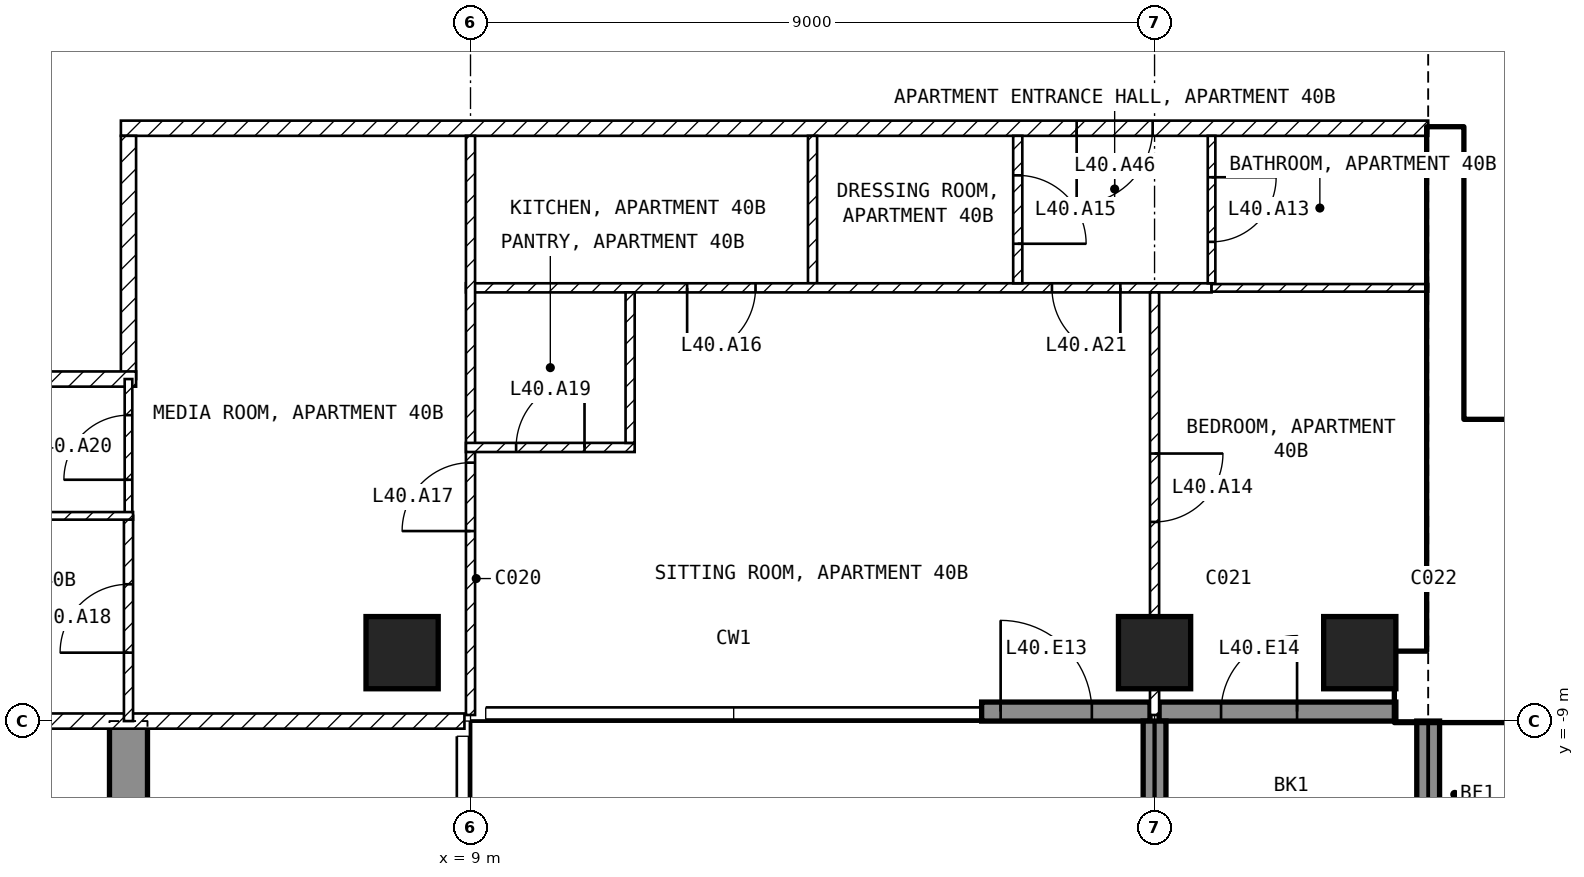
"""IFC4 building model, lengths in metres.
Left out: names, types, materials, properties, quantities, classifications, styles, units other than length and angle.
Written with IfcOpenShell. Run it as: python <this file> out.ifc"""

import sys

from ifc_helpers import new_model, si_unit, direction, frame, frame_2d, origin, origin_2d, place, context, subcontext, project, spatial, polyline, rectangle, outline, extrude, element, fill, save


model = new_model("IFC4")
c1 = context("Model", 3, precision=1e-05, world=origin(), true_north=direction((0.0, 1.0)))
c2 = subcontext(c1, "Body", "Model", "MODEL_VIEW")
j1 = project(units=[si_unit("LENGTHUNIT", "METRE"), si_unit("PLANEANGLEUNIT", "RADIAN")], contexts=[c1])
p1 = place(None, origin())
s1 = spatial("IfcSite", under=j1, at=p1, CompositionType="ELEMENT")
p2 = place(p1, origin())
s2 = spatial("IfcBuilding", under=s1, at=p2, CompositionType="ELEMENT")
p3 = place(p2, frame((0.0, 0.0, 166.6)))
s3 = spatial("IfcBuildingStorey", under=s2, at=p3, CompositionType="ELEMENT", Elevation=166.6)
for number, where, z_axis, x_axis in (
    (1, (8.1, -8.1, -0.25), (0.0, 0.0, 1.0), (1.0, 0.0, 0.0)),
    (2, (18.0, -8.1, -0.25), (0.0, 0.0, 1.0), (1.0, 0.0, 0.0)),
    (3, (20.7, -8.1, -0.25), (0.0, 0.0, 1.0), (1.0, 0.0, 0.0)),
):
    element("IfcColumn", number, at=place(p3, frame(where, z_axis=z_axis, x_axis=x_axis)), inside=s3, PredefinedType="COLUMN", context=c2, shape_type="SweptSolid", body=[
        extrude(rectangle(XDim=0.95, YDim=0.95, at=origin_2d()), origin(), (0.0, 0.0, 1.0), 3.5),
    ])
p4 = place(p3, frame((4.25, -20.225, -0.25), z_axis=(1.0, 0.0, 0.0), x_axis=(0.0, 1.0, 0.0)))
e4 = element("IfcWall", 4, at=p4, inside=s3, PredefinedType="SHEAR", context=c2, shape_type="SweptSolid", body=[
    extrude(outline(polyline([(0.0, 0.0), (6.725, 0.0), (6.725, 2.65), (9.125, 2.65), (9.125, 0.0), (11.225, 0.0), (11.225, 3.5), (0.0, 3.5), (0.0, 0.0)])), origin(), (0.0, 0.0, 1.0), 0.5),
])
p5 = place(p3, frame((15.725, -8.875, 0.0), z_axis=(0.0, 0.0, 1.0), x_axis=(1.0, 0.0, 0.0)))
e5 = element("IfcWall", 5, at=p5, inside=s3, PredefinedType="SOLIDWALL", context=c2, shape_type="SweptSolid", body=[
    extrude(rectangle(XDim=2.215, YDim=0.25, at=frame_2d((1.107, 0.0))), origin(), (0.0, 0.0, 1.0), 3.25),
])
p6 = place(p5, frame((0.25, 0.0, 0.0)))
e6 = element("IfcOpeningElement", 6, at=p6, cuts=e5, PredefinedType="OPENING", context=c2, shape_type="SweptSolid", body=[
    extrude(rectangle(XDim=1.2, YDim=2.4, at=frame_2d((0.6, 1.2))), frame((0.0, 0.135, 0.0), z_axis=(0.0, -1.0, 0.0), x_axis=(1.0, 0.0, 0.0)), (0.0, 0.0, 1.0), 0.27),
])
p7 = place(p3, frame((18.06, -8.875, 0.0), z_axis=(0.0, 0.0, 1.0), x_axis=(1.0, 0.0, 0.0)))
e7 = element("IfcWall", 7, at=p7, inside=s3, PredefinedType="SOLIDWALL", context=c2, shape_type="SweptSolid", body=[
    extrude(rectangle(XDim=3.115, YDim=0.25, at=frame_2d((1.558, 0.0))), origin(), (0.0, 0.0, 1.0), 3.25),
])
p8 = place(p7, frame((0.815, 0.0, 0.0)))
e8 = element("IfcOpeningElement", 8, at=p8, cuts=e7, PredefinedType="OPENING", context=c2, shape_type="SweptSolid", body=[
    extrude(rectangle(XDim=1.0, YDim=2.4, at=frame_2d((0.5, 1.2))), frame((0.0, 0.135, 0.0), z_axis=(0.0, -1.0, 0.0), x_axis=(1.0, 0.0, 0.0)), (0.0, 0.0, 1.0), 0.27),
])
for number, where, z_axis, x_axis in (
    (9, (18.0, -9.0, 0.0), (0.0, 0.0, 1.0), (0.0, -1.0, 0.0)),
    (10, (21.6, -9.0, 0.0), (0.0, 0.0, 1.0), (0.0, -1.0, 0.0)),
):
    element("IfcWall", number, at=place(p3, frame(where, z_axis=z_axis, x_axis=x_axis)), inside=s3, PredefinedType="SOLIDWALL", context=c2, shape_type="SweptSolid", body=[
        extrude(rectangle(XDim=2.7, YDim=0.3, at=frame_2d((1.35, 0.0))), origin(), (0.0, 0.0, 1.0), 3.25),
    ])
p9 = place(p3, frame((21.175, -8.55, 0.0), z_axis=(0.0, 0.0, 1.0), x_axis=(1.0, 0.0, 0.0)))
e11 = element("IfcWall", 11, at=p9, inside=s3, PredefinedType="SHEAR", context=c2, shape_type="SweptSolid", body=[
    extrude(rectangle(XDim=9.025, YDim=0.9, at=frame_2d((4.512, 0.0))), origin(), (0.0, 0.0, 1.0), 3.25),
])
p10 = place(p3, frame((21.825, -8.1, 0.0), z_axis=(0.0, 0.0, 1.0), x_axis=(0.0, 1.0, 0.0)))
e12 = element("IfcWall", 12, at=p10, inside=s3, PredefinedType="SHEAR", context=c2, shape_type="SweptSolid", body=[
    extrude(rectangle(XDim=6.9, YDim=0.45, at=frame_2d((3.45, 0.0))), origin(), (0.0, 0.0, 1.0), 3.25),
])
p11 = place(p3, frame((22.05, -5.15, 0.0), z_axis=(0.0, 0.0, 1.0), x_axis=(1.0, 0.0, 0.0)))
e13 = element("IfcWall", 13, at=p11, inside=s3, PredefinedType="SOLIDWALL", context=c2, shape_type="SweptSolid", body=[
    extrude(rectangle(XDim=6.3, YDim=0.2, at=frame_2d((3.15, 0.0))), origin(), (0.0, 0.0, 1.0), 3.25),
])
p12 = place(p11, frame((0.2, 0.0, 0.0)))
e14 = element("IfcOpeningElement", 14, at=p12, cuts=e13, PredefinedType="OPENING", context=c2, shape_type="SweptSolid", body=[
    extrude(rectangle(XDim=1.0, YDim=2.1, at=frame_2d((0.5, 1.05))), frame((0.0, 0.11, 0.0), z_axis=(0.0, -1.0, 0.0), x_axis=(1.0, 0.0, 0.0)), (0.0, 0.0, 1.0), 0.22),
])
p13 = place(p3, frame((21.6, -1.2, 0.0), z_axis=(0.0, 0.0, 1.0), x_axis=(-1.0, 0.0, 0.0)))
e15 = element("IfcWall", 15, at=p13, inside=s3, PredefinedType="PARTITIONING", context=c2, shape_type="SweptSolid", body=[
    extrude(rectangle(XDim=17.2, YDim=0.2, at=frame_2d((8.6, 0.0))), origin(), (0.0, 0.0, 1.0), 3.25),
])
p14 = place(p13, frame((3.625, 0.0, 0.0)))
e16 = element("IfcOpeningElement", 16, at=p14, cuts=e15, PredefinedType="OPENING", context=c2, shape_type="SweptSolid", body=[
    extrude(rectangle(XDim=1.0, YDim=2.1, at=frame_2d((0.5, 1.05))), frame((0.0, 0.11, 0.0), z_axis=(0.0, -1.0, 0.0), x_axis=(1.0, 0.0, 0.0)), (0.0, 0.0, 1.0), 0.22),
])
p15 = place(p3, frame((4.5, -1.3, 0.0), z_axis=(0.0, 0.0, 1.0), x_axis=(0.0, -1.0, 0.0)))
e17 = element("IfcWall", 17, at=p15, inside=s3, PredefinedType="PARTITIONING", context=c2, shape_type="SweptSolid", body=[
    extrude(rectangle(XDim=3.2, YDim=0.2, at=frame_2d((1.6, 0.0))), origin(), (0.0, 0.0, 1.0), 3.25),
])
p16 = place(p3, frame((4.6, -4.5, 0.0), z_axis=(0.0, 0.0, 1.0), x_axis=(-1.0, 0.0, 0.0)))
e18 = element("IfcWall", 18, at=p16, inside=s3, PredefinedType="PARTITIONING", context=c2, shape_type="SweptSolid", body=[
    extrude(rectangle(XDim=3.5, YDim=0.2, at=frame_2d((1.75, 0.0))), origin(), (0.0, 0.0, 1.0), 3.25),
])
p17 = place(p3, frame((8.92, -9.0, 0.0), z_axis=(0.0, 0.0, 1.0), x_axis=(-1.0, 0.0, 0.0)))
e19 = element("IfcWall", 19, at=p17, inside=s3, PredefinedType="PARTITIONING", context=c2, shape_type="SweptSolid", body=[
    extrude(rectangle(XDim=17.84, YDim=0.2, at=frame_2d((8.92, 0.0))), origin(), (0.0, 0.0, 1.0), 3.25),
])
p18 = place(p17, frame((8.42, 0.0, 0.0)))
e20 = element("IfcOpeningElement", 20, at=p18, cuts=e19, PredefinedType="OPENING", context=c2, shape_type="SweptSolid", body=[
    extrude(rectangle(XDim=1.0, YDim=2.1, at=frame_2d((0.5, 1.05))), frame((0.0, 0.11, 0.0), z_axis=(0.0, -1.0, 0.0), x_axis=(1.0, 0.0, 0.0)), (0.0, 0.0, 1.0), 0.22),
])
p19 = place(p3, frame((13.5, -1.3, 0.0), z_axis=(0.0, 0.0, 1.0), x_axis=(0.0, -1.0, 0.0)))
e21 = element("IfcWall", 21, at=p19, inside=s3, PredefinedType="PARTITIONING", context=c2, shape_type="SweptSolid", body=[
    extrude(rectangle(XDim=1.94, YDim=0.12, at=frame_2d((0.97, 0.0))), origin(), (0.0, 0.0, 1.0), 3.25),
])
p20 = place(p3, frame((18.75, -3.3, 0.0), z_axis=(0.0, 0.0, 1.0), x_axis=(-1.0, 0.0, 0.0)))
e22 = element("IfcWall", 22, at=p20, inside=s3, PredefinedType="PARTITIONING", context=c2, shape_type="SweptSolid", body=[
    extrude(rectangle(XDim=9.81, YDim=0.12, at=frame_2d((4.905, 0.0))), origin(), (0.0, 0.0, 1.0), 3.25),
])
p21 = place(p20, frame((6.0, 0.0, 0.0)))
e23 = element("IfcOpeningElement", 23, at=p21, cuts=e22, PredefinedType="OPENING", context=c2, shape_type="SweptSolid", body=[
    extrude(rectangle(XDim=0.9, YDim=2.1, at=frame_2d((0.45, 1.05))), frame((0.0, 0.07, 0.0), z_axis=(0.0, -1.0, 0.0), x_axis=(1.0, 0.0, 0.0)), (0.0, 0.0, 1.0), 0.14),
])
p22 = place(p20, frame((1.2, 0.0, 0.0)))
e24 = element("IfcOpeningElement", 24, at=p22, cuts=e22, PredefinedType="OPENING", context=c2, shape_type="SweptSolid", body=[
    extrude(rectangle(XDim=0.9, YDim=2.1, at=frame_2d((0.45, 1.05))), frame((0.0, 0.07, 0.0), z_axis=(0.0, -1.0, 0.0), x_axis=(1.0, 0.0, 0.0)), (0.0, 0.0, 1.0), 0.14),
])
p23 = place(p3, frame((9.0, -8.92, 0.0), z_axis=(0.0, 0.0, 1.0), x_axis=(0.0, 1.0, 0.0)))
e25 = element("IfcWall", 25, at=p23, inside=s3, PredefinedType="PARTITIONING", context=c2, shape_type="SweptSolid", body=[
    extrude(rectangle(XDim=7.62, YDim=0.12, at=frame_2d((3.81, 0.0))), origin(), (0.0, 0.0, 1.0), 3.25),
])
p24 = place(p23, frame((2.42, 0.0, 0.0)))
e26 = element("IfcOpeningElement", 26, at=p24, cuts=e25, PredefinedType="OPENING", context=c2, shape_type="SweptSolid", body=[
    extrude(rectangle(XDim=0.9, YDim=2.1, at=frame_2d((0.45, 1.05))), frame((0.0, 0.07, 0.0), z_axis=(0.0, -1.0, 0.0), x_axis=(1.0, 0.0, 0.0)), (0.0, 0.0, 1.0), 0.14),
])
p25 = place(p3, frame((16.2, -1.3, 0.0), z_axis=(0.0, 0.0, 1.0), x_axis=(0.0, -1.0, 0.0)))
e27 = element("IfcWall", 27, at=p25, inside=s3, PredefinedType="PARTITIONING", context=c2, shape_type="SweptSolid", body=[
    extrude(rectangle(XDim=1.94, YDim=0.12, at=frame_2d((0.97, 0.0))), origin(), (0.0, 0.0, 1.0), 3.25),
])
p26 = place(p25, frame((0.52, 0.0, 0.0)))
e28 = element("IfcOpeningElement", 28, at=p26, cuts=e27, PredefinedType="OPENING", context=c2, shape_type="SweptSolid", body=[
    extrude(rectangle(XDim=0.9, YDim=2.1, at=frame_2d((0.45, 1.05))), frame((0.0, 0.07, 0.0), z_axis=(0.0, -1.0, 0.0), x_axis=(1.0, 0.0, 0.0)), (0.0, 0.0, 1.0), 0.14),
])
p27 = place(p3, frame((18.75, -1.3, 0.0), z_axis=(0.0, 0.0, 1.0), x_axis=(0.0, -1.0, 0.0)))
e29 = element("IfcWall", 29, at=p27, inside=s3, PredefinedType="PARTITIONING", context=c2, shape_type="SweptSolid", body=[
    extrude(rectangle(XDim=1.94, YDim=0.1, at=frame_2d((0.97, 0.0))), origin(), (0.0, 0.0, 1.0), 3.25),
])
p28 = place(p27, frame((0.545, 0.0, 0.0)))
e30 = element("IfcOpeningElement", 30, at=p28, cuts=e29, PredefinedType="OPENING", context=c2, shape_type="SweptSolid", body=[
    extrude(rectangle(XDim=0.85, YDim=2.1, at=frame_2d((0.425, 1.05))), frame((0.0, 0.06, 0.0), z_axis=(0.0, -1.0, 0.0), x_axis=(1.0, 0.0, 0.0)), (0.0, 0.0, 1.0), 0.12),
])
p29 = place(p3, frame((21.6, -3.3, 0.0), z_axis=(0.0, 0.0, 1.0), x_axis=(-1.0, 0.0, 0.0)))
e31 = element("IfcWall", 31, at=p29, inside=s3, PredefinedType="PARTITIONING", context=c2, shape_type="SweptSolid", body=[
    extrude(rectangle(XDim=2.85, YDim=0.1, at=frame_2d((1.425, 0.0))), origin(), (0.0, 0.0, 1.0), 3.25),
])
p30 = place(p3, frame((8.94, -5.4, 0.0), z_axis=(0.0, 0.0, 1.0), x_axis=(1.0, 0.0, 0.0)))
e32 = element("IfcWall", 32, at=p30, inside=s3, PredefinedType="PARTITIONING", context=c2, shape_type="SweptSolid", body=[
    extrude(rectangle(XDim=2.22, YDim=0.12, at=frame_2d((1.11, 0.0))), origin(), (0.0, 0.0, 1.0), 3.25),
])
p31 = place(p30, frame((0.66, 0.0, 0.0)))
e33 = element("IfcOpeningElement", 33, at=p31, cuts=e32, PredefinedType="OPENING", context=c2, shape_type="SweptSolid", body=[
    extrude(rectangle(XDim=0.9, YDim=2.1, at=frame_2d((0.45, 1.05))), frame((0.0, 0.07, 0.0), z_axis=(0.0, -1.0, 0.0), x_axis=(1.0, 0.0, 0.0)), (0.0, 0.0, 1.0), 0.14),
])
p32 = place(p3, frame((11.1, -5.34, 0.0), z_axis=(0.0, 0.0, 1.0), x_axis=(0.0, 1.0, 0.0)))
e34 = element("IfcWall", 34, at=p32, inside=s3, PredefinedType="PARTITIONING", context=c2, shape_type="SweptSolid", body=[
    extrude(rectangle(XDim=1.98, YDim=0.12, at=frame_2d((0.99, 0.0))), origin(), (0.0, 0.0, 1.0), 3.25),
])
p33 = place(p3, frame((18.0, -3.36, 0.0), z_axis=(0.0, 0.0, 1.0), x_axis=(0.0, -1.0, 0.0)))
e35 = element("IfcWall", 35, at=p33, inside=s3, PredefinedType="PARTITIONING", context=c2, shape_type="SweptSolid", body=[
    extrude(rectangle(XDim=5.56, YDim=0.12, at=frame_2d((2.78, 0.0))), origin(), (0.0, 0.0, 1.0), 2.48),
])
p34 = place(p33, frame((2.12, 0.0, 0.0)))
e36 = element("IfcOpeningElement", 36, at=p34, cuts=e35, PredefinedType="OPENING", context=c2, shape_type="SweptSolid", body=[
    extrude(rectangle(XDim=0.9, YDim=2.1, at=frame_2d((0.45, 1.05))), frame((0.0, 0.07, 0.0), z_axis=(0.0, -1.0, 0.0), x_axis=(1.0, 0.0, 0.0)), (0.0, 0.0, 1.0), 0.14),
])
p35 = place(p3, frame((4.5, -6.3, 0.0), z_axis=(0.0, 0.0, 1.0), x_axis=(0.0, 1.0, 0.0)))
e37 = element("IfcWall", 37, at=p35, inside=s3, PredefinedType="PARTITIONING", context=c2, shape_type="SweptSolid", body=[
    extrude(rectangle(XDim=1.8, YDim=0.1, at=frame_2d((0.9, 0.0))), origin(), (0.0, 0.0, 1.0), 3.25),
])
p36 = place(p35, frame((0.475, 0.0, 0.0)))
e38 = element("IfcOpeningElement", 38, at=p36, cuts=e37, PredefinedType="OPENING", context=c2, shape_type="SweptSolid", body=[
    extrude(rectangle(XDim=0.85, YDim=2.1, at=frame_2d((0.425, 1.05))), frame((0.0, 0.06, 0.0), z_axis=(0.0, -1.0, 0.0), x_axis=(1.0, 0.0, 0.0)), (0.0, 0.0, 1.0), 0.12),
])
p37 = place(p3, frame((4.5, -9.0, 0.0), z_axis=(0.0, 0.0, 1.0), x_axis=(0.0, 1.0, 0.0)))
e39 = element("IfcWall", 39, at=p37, inside=s3, PredefinedType="PARTITIONING", context=c2, shape_type="SweptSolid", body=[
    extrude(rectangle(XDim=2.7, YDim=0.12, at=frame_2d((1.35, 0.0))), origin(), (0.0, 0.0, 1.0), 3.25),
])
p38 = place(p37, frame((0.9, 0.0, 0.0)))
e40 = element("IfcOpeningElement", 40, at=p38, cuts=e39, PredefinedType="OPENING", context=c2, shape_type="SweptSolid", body=[
    extrude(rectangle(XDim=0.9, YDim=2.1, at=frame_2d((0.45, 1.05))), frame((0.0, 0.07, 0.0), z_axis=(0.0, -1.0, 0.0), x_axis=(1.0, 0.0, 0.0)), (0.0, 0.0, 1.0), 0.14),
])
p39 = place(p3, frame((4.56, -6.3, 0.0), z_axis=(0.0, 0.0, 1.0), x_axis=(-1.0, 0.0, 0.0)))
e41 = element("IfcWall", 41, at=p39, inside=s3, PredefinedType="PARTITIONING", context=c2, shape_type="SweptSolid", body=[
    extrude(rectangle(XDim=3.46, YDim=0.1, at=frame_2d((1.73, 0.0))), origin(), (0.0, 0.0, 1.0), 3.25),
])
p40 = place(p6, origin())
e42 = element("IfcDoor", 42, at=p40, inside=s3, OperationType="SINGLE_SWING_LEFT", PredefinedType="DOOR", context=c2, shape_type="SweptSolid", body=[
    extrude(rectangle(XDim=1.2, YDim=2.4, at=frame_2d((0.6, 1.2))), frame((0.0, 0.025, 0.0), z_axis=(0.0, -1.0, 0.0), x_axis=(1.0, 0.0, 0.0)), (0.0, 0.0, 1.0), 0.05),
])
fill(e6, e42)
p41 = place(p8, origin())
e43 = element("IfcDoor", 43, at=p41, inside=s3, OperationType="SINGLE_SWING_RIGHT", PredefinedType="DOOR", context=c2, shape_type="SweptSolid", body=[
    extrude(rectangle(XDim=1.0, YDim=2.4, at=frame_2d((0.5, 1.2))), frame((0.0, 0.025, 0.0), z_axis=(0.0, -1.0, 0.0), x_axis=(1.0, 0.0, 0.0)), (0.0, 0.0, 1.0), 0.05),
])
fill(e8, e43)
p42 = place(p12, origin())
e44 = element("IfcDoor", 44, at=p42, inside=s3, OperationType="SINGLE_SWING_LEFT", PredefinedType="DOOR", context=c2, shape_type="SweptSolid", body=[
    extrude(rectangle(XDim=1.0, YDim=2.1, at=frame_2d((0.5, 1.05))), frame((0.0, 0.025, 0.0), z_axis=(0.0, -1.0, 0.0), x_axis=(1.0, 0.0, 0.0)), (0.0, 0.0, 1.0), 0.05),
])
fill(e14, e44)
p43 = place(p28, origin())
e45 = element("IfcDoor", 45, at=p43, inside=s3, OperationType="SINGLE_SWING_LEFT", PredefinedType="DOOR", context=c2, shape_type="SweptSolid", body=[
    extrude(rectangle(XDim=0.85, YDim=2.1, at=frame_2d((0.425, 1.05))), frame((0.0, 0.025, 0.0), z_axis=(0.0, -1.0, 0.0), x_axis=(1.0, 0.0, 0.0)), (0.0, 0.0, 1.0), 0.05),
])
fill(e30, e45)
p44 = place(p34, origin())
e46 = element("IfcDoor", 46, at=p44, inside=s3, OperationType="SINGLE_SWING_LEFT", PredefinedType="DOOR", context=c2, shape_type="SweptSolid", body=[
    extrude(rectangle(XDim=0.9, YDim=2.1, at=frame_2d((0.45, 1.05))), frame((0.0, 0.025, 0.0), z_axis=(0.0, -1.0, 0.0), x_axis=(1.0, 0.0, 0.0)), (0.0, 0.0, 1.0), 0.05),
])
fill(e36, e46)
p45 = place(p26, origin())
e47 = element("IfcDoor", 47, at=p45, inside=s3, OperationType="SINGLE_SWING_RIGHT", PredefinedType="DOOR", context=c2, shape_type="SweptSolid", body=[
    extrude(rectangle(XDim=0.9, YDim=2.1, at=frame_2d((0.45, 1.05))), frame((0.0, 0.025, 0.0), z_axis=(0.0, -1.0, 0.0), x_axis=(1.0, 0.0, 0.0)), (0.0, 0.0, 1.0), 0.05),
])
fill(e28, e47)
p46 = place(p21, origin())
e48 = element("IfcDoor", 48, at=p46, inside=s3, OperationType="SINGLE_SWING_RIGHT", PredefinedType="DOOR", context=c2, shape_type="SweptSolid", body=[
    extrude(rectangle(XDim=0.9, YDim=2.1, at=frame_2d((0.45, 1.05))), frame((0.0, 0.025, 0.0), z_axis=(0.0, -1.0, 0.0), x_axis=(1.0, 0.0, 0.0)), (0.0, 0.0, 1.0), 0.05),
])
fill(e23, e48)
p47 = place(p24, origin())
e49 = element("IfcDoor", 49, at=p47, inside=s3, OperationType="SINGLE_SWING_LEFT", PredefinedType="DOOR", context=c2, shape_type="SweptSolid", body=[
    extrude(rectangle(XDim=0.9, YDim=2.1, at=frame_2d((0.45, 1.05))), frame((0.0, 0.025, 0.0), z_axis=(0.0, -1.0, 0.0), x_axis=(1.0, 0.0, 0.0)), (0.0, 0.0, 1.0), 0.05),
])
fill(e26, e49)
p48 = place(p38, origin())
e50 = element("IfcDoor", 50, at=p48, inside=s3, OperationType="SINGLE_SWING_LEFT", PredefinedType="DOOR", context=c2, shape_type="SweptSolid", body=[
    extrude(rectangle(XDim=0.9, YDim=2.1, at=frame_2d((0.45, 1.05))), frame((0.0, 0.025, 0.0), z_axis=(0.0, -1.0, 0.0), x_axis=(1.0, 0.0, 0.0)), (0.0, 0.0, 1.0), 0.05),
])
fill(e40, e50)
p49 = place(p31, origin())
e51 = element("IfcDoor", 51, at=p49, inside=s3, OperationType="SINGLE_SWING_RIGHT", PredefinedType="DOOR", context=c2, shape_type="SweptSolid", body=[
    extrude(rectangle(XDim=0.9, YDim=2.1, at=frame_2d((0.45, 1.05))), frame((0.0, 0.025, 0.0), z_axis=(0.0, -1.0, 0.0), x_axis=(1.0, 0.0, 0.0)), (0.0, 0.0, 1.0), 0.05),
])
fill(e33, e51)
p50 = place(p36, origin())
e52 = element("IfcDoor", 52, at=p50, inside=s3, OperationType="SINGLE_SWING_LEFT", PredefinedType="DOOR", context=c2, shape_type="SweptSolid", body=[
    extrude(rectangle(XDim=0.85, YDim=2.1, at=frame_2d((0.425, 1.05))), frame((0.0, 0.025, 0.0), z_axis=(0.0, -1.0, 0.0), x_axis=(1.0, 0.0, 0.0)), (0.0, 0.0, 1.0), 0.05),
])
fill(e38, e52)
p51 = place(p22, origin())
e53 = element("IfcDoor", 53, at=p51, inside=s3, OperationType="SINGLE_SWING_LEFT", PredefinedType="DOOR", context=c2, shape_type="SweptSolid", body=[
    extrude(rectangle(XDim=0.9, YDim=2.1, at=frame_2d((0.45, 1.05))), frame((0.0, 0.025, 0.0), z_axis=(0.0, -1.0, 0.0), x_axis=(1.0, 0.0, 0.0)), (0.0, 0.0, 1.0), 0.05),
])
fill(e24, e53)
p52 = place(p14, origin())
e54 = element("IfcDoor", 54, at=p52, inside=s3, OperationType="SINGLE_SWING_RIGHT", PredefinedType="DOOR", context=c2, shape_type="SweptSolid", body=[
    extrude(rectangle(XDim=1.0, YDim=2.1, at=frame_2d((0.5, 1.05))), frame((0.0, 0.025, 0.0), z_axis=(0.0, -1.0, 0.0), x_axis=(1.0, 0.0, 0.0)), (0.0, 0.0, 1.0), 0.05),
])
fill(e16, e54)
save(model, sys.argv[1])
